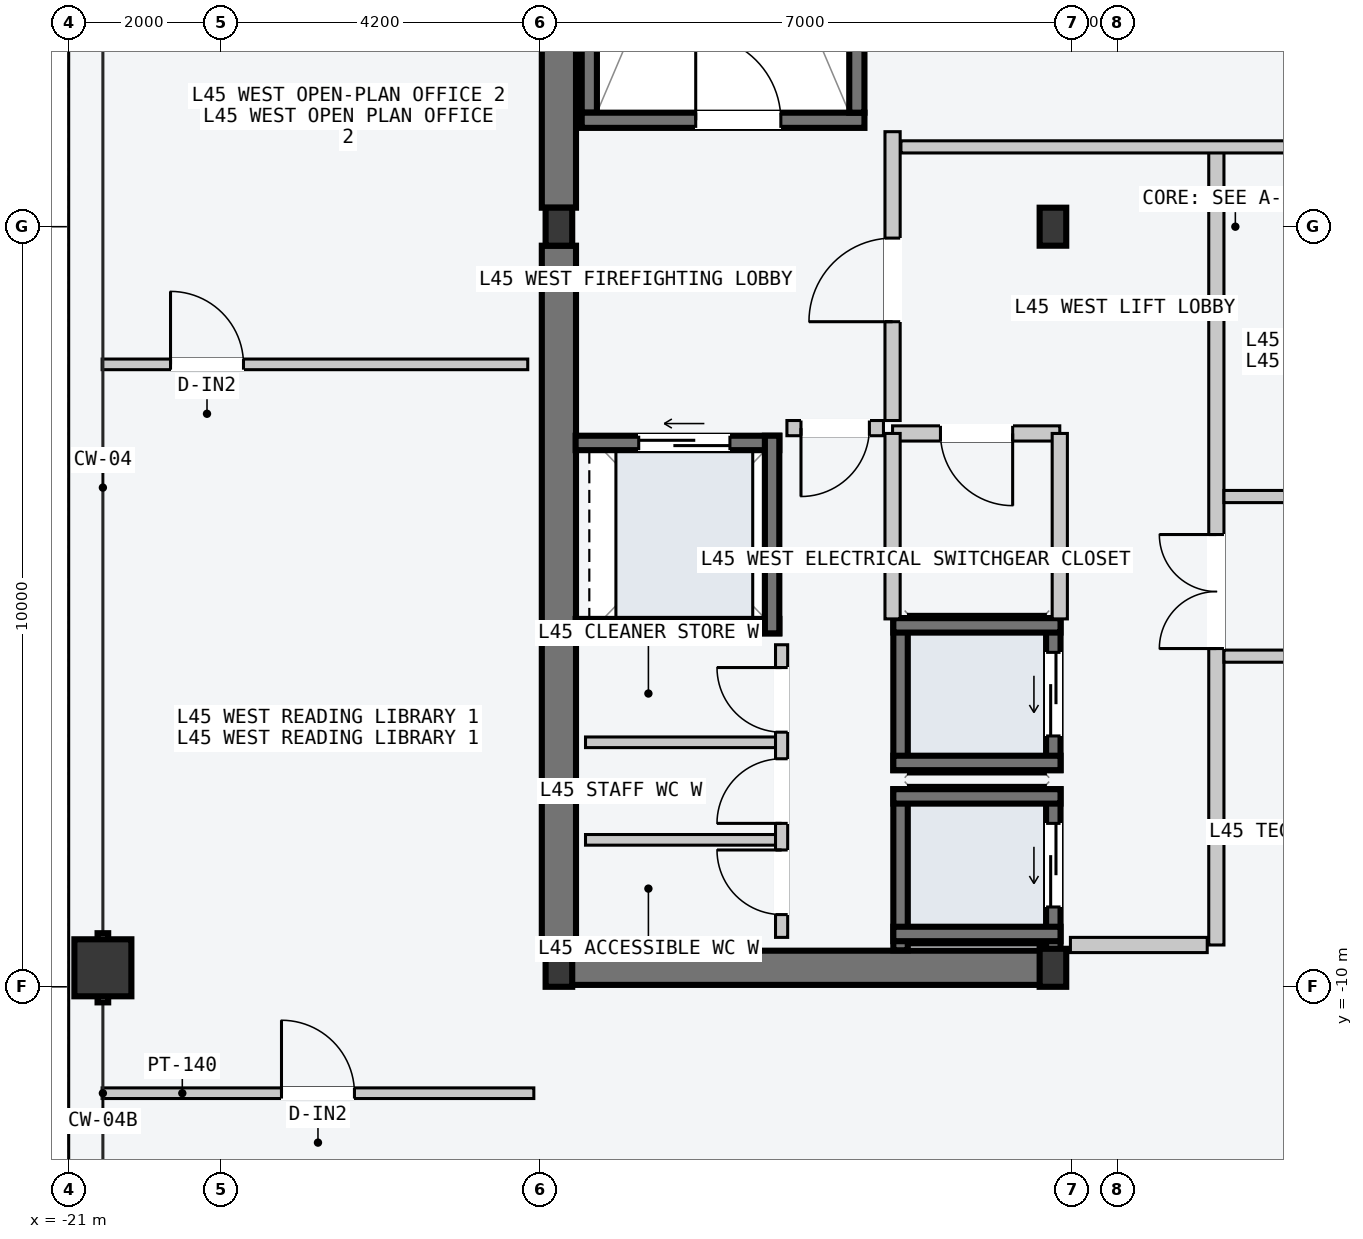
"""IFC4 building model, lengths in metres.
Left out: names, types, materials, properties, quantities, classifications, styles, units other than length and angle.
Written with IfcOpenShell. Run it as: python <this file> out.ifc"""

import sys

from ifc_helpers import new_model, si_unit, direction, frame, frame_2d, origin, origin_2d, place, context, subcontext, project, spatial, rectangle, hollow_rectangle, i_section, extrude, element, fill, save


model = new_model("IFC4")
c1 = context("Model", 3, precision=1e-05, world=origin(), true_north=direction((0.0, 1.0)))
c2 = subcontext(c1, "Body", "Model", "MODEL_VIEW")
j1 = project(units=[si_unit("LENGTHUNIT", "METRE"), si_unit("PLANEANGLEUNIT", "RADIAN")], contexts=[c1])
p1 = place(None, origin())
s1 = spatial("IfcSite", under=j1, at=p1, CompositionType="ELEMENT")
p2 = place(p1, origin())
s2 = spatial("IfcBuilding", under=s1, at=p2, CompositionType="ELEMENT")
p3 = place(p2, frame((0.0, 0.0, 173.1)))
s3 = spatial("IfcBuildingStorey", under=s2, at=p3, CompositionType="ELEMENT", Elevation=173.1)
p4 = place(p3, frame((-14.53, -9.75, -0.2), z_axis=(0.0, 0.0, 1.0), x_axis=(1.0, 0.0, 0.0)))
e1 = element("IfcWall", 1, at=p4, inside=s3, PredefinedType="SHEAR", context=c2, shape_type="SweptSolid", body=[
    extrude(rectangle(XDim=6.46, YDim=0.45, at=frame_2d((3.23, 0.0))), origin(), (0.0, 0.0, 1.0), 3.6),
])
for number, where, z_axis, x_axis in (
    (2, (-14.55, -9.5, -0.2), (0.0, 0.0, 1.0), (0.0, 1.0, 0.0)),
    (3, (-14.55, 0.25, -0.2), (0.0, 0.0, 1.0), (0.0, 1.0, 0.0)),
):
    element("IfcWall", number, at=place(p3, frame(where, z_axis=z_axis, x_axis=x_axis)), inside=s3, PredefinedType="SHEAR", context=c2, shape_type="SweptSolid", body=[
        extrude(rectangle(XDim=9.25, YDim=0.45, at=frame_2d((4.625, 0.0))), origin(), (0.0, 0.0, 1.0), 3.6),
    ])
p5 = place(p3, frame((-14.15, 1.5, -0.2), z_axis=(0.0, 0.0, 1.0), x_axis=(0.0, 1.0, 0.0)))
e4 = element("IfcWall", 4, at=p5, inside=s3, PredefinedType="SOLIDWALL", context=c2, shape_type="SweptSolid", body=[
    extrude(rectangle(XDim=7.8, YDim=0.2, at=frame_2d((3.9, 0.0))), origin(), (0.0, 0.0, 1.0), 3.6),
])
p6 = place(p3, frame((-14.25, 1.4, -0.2), z_axis=(0.0, 0.0, 1.0), x_axis=(1.0, 0.0, 0.0)))
e5 = element("IfcWall", 5, at=p6, inside=s3, PredefinedType="SOLIDWALL", context=c2, shape_type="SweptSolid", body=[
    extrude(rectangle(XDim=3.72, YDim=0.2, at=frame_2d((1.86, 0.0))), origin(), (0.0, 0.0, 1.0), 3.6),
])
p7 = place(p6, frame((1.5, 0.0, 0.2)))
e6 = element("IfcOpeningElement", 6, at=p7, cuts=e5, PredefinedType="OPENING", context=c2, shape_type="SweptSolid", body=[
    extrude(rectangle(XDim=1.12, YDim=2.18, at=frame_2d((0.56, 1.09))), frame((0.0, 0.11, 0.0), z_axis=(0.0, -1.0, 0.0), x_axis=(1.0, 0.0, 0.0)), (0.0, 0.0, 1.0), 0.22),
])
p8 = place(p3, frame((-10.63, 1.5, -0.2), z_axis=(0.0, 0.0, 1.0), x_axis=(0.0, 1.0, 0.0)))
e7 = element("IfcWall", 7, at=p8, inside=s3, PredefinedType="SOLIDWALL", context=c2, shape_type="SweptSolid", body=[
    extrude(rectangle(XDim=7.8, YDim=0.2, at=frame_2d((3.9, 0.0))), origin(), (0.0, 0.0, 1.0), 3.6),
])
for number, where, z_axis, x_axis in (
    (8, (-14.55, -9.75, 0.0), (0.0, 0.0, 1.0), (1.0, 0.0, 0.0)),
    (9, (-14.55, 0.0, 0.0), (0.0, 0.0, 1.0), (1.0, 0.0, 0.0)),
    (10, (-8.05, -9.75, 0.0), (0.0, 0.0, 1.0), (1.0, 0.0, 0.0)),
    (11, (-8.05, 0.0, 0.0), (0.0, 0.0, 1.0), (1.0, 0.0, 0.0)),
):
    element("IfcColumn", number, at=place(p3, frame(where, z_axis=z_axis, x_axis=x_axis)), inside=s3, PredefinedType="COLUMN", context=c2, shape_type="SweptSolid", body=[
        extrude(i_section(OverallWidth=0.35, OverallDepth=0.5, WebThickness=0.02, FlangeThickness=0.032, at=origin_2d()), origin(), (0.0, 0.0, 1.0), 3.6),
    ])
p9 = place(p3, frame((-20.55, -9.75, 0.0), z_axis=(0.0, 0.0, 1.0), x_axis=(0.0, 1.0, 0.0)))
e12 = element("IfcColumn", 12, at=p9, inside=s3, PredefinedType="COLUMN", context=c2, shape_type="SweptSolid", body=[
    extrude(hollow_rectangle(XDim=0.75, YDim=0.75, WallThickness=0.032, at=origin_2d()), origin(), (0.0, 0.0, 1.0), 3.6),
])
p10 = place(p3, frame((-8.045, -9.52, -0.2), z_axis=(0.0, 0.0, 1.0), x_axis=(0.0, 1.0, 0.0)))
e13 = element("IfcWall", 13, at=p10, inside=s3, PredefinedType="SOLIDWALL", context=c2, shape_type="SweptSolid", body=[
    extrude(rectangle(XDim=2.12, YDim=0.19, at=frame_2d((1.06, 0.0))), origin(), (0.0, 0.0, 1.0), 3.6),
])
p11 = place(p10, frame((0.57, 0.0, 0.2)))
e14 = element("IfcOpeningElement", 14, at=p11, cuts=e13, PredefinedType="OPENING", context=c2, shape_type="SweptSolid", body=[
    extrude(rectangle(XDim=1.1, YDim=2.2, at=frame_2d((0.55, 1.1))), frame((0.0, 0.105, 0.0), z_axis=(0.0, -1.0, 0.0), x_axis=(1.0, 0.0, 0.0)), (0.0, 0.0, 1.0), 0.21),
])
p12 = place(p3, frame((-10.055, -9.52, -0.2), z_axis=(0.0, 0.0, 1.0), x_axis=(0.0, 1.0, 0.0)))
e15 = element("IfcWall", 15, at=p12, inside=s3, PredefinedType="SOLIDWALL", context=c2, shape_type="SweptSolid", body=[
    extrude(rectangle(XDim=2.12, YDim=0.19, at=frame_2d((1.06, 0.0))), origin(), (0.0, 0.0, 1.0), 3.6),
])
for number, where, z_axis, x_axis in (
    (16, (-10.15, -7.495, -0.2), (0.0, 0.0, 1.0), (1.0, 0.0, 0.0)),
    (17, (-10.15, -9.305, -0.2), (0.0, 0.0, 1.0), (1.0, 0.0, 0.0)),
):
    element("IfcWall", number, at=place(p3, frame(where, z_axis=z_axis, x_axis=x_axis)), inside=s3, PredefinedType="SOLIDWALL", context=c2, shape_type="SweptSolid", body=[
        extrude(rectangle(XDim=2.2, YDim=0.19, at=frame_2d((1.1, 0.0))), origin(), (0.0, 0.0, 1.0), 3.6),
    ])
p13 = place(p3, frame((-8.045, -7.15, -0.2), z_axis=(0.0, 0.0, 1.0), x_axis=(0.0, 1.0, 0.0)))
e18 = element("IfcWall", 18, at=p13, inside=s3, PredefinedType="SOLIDWALL", context=c2, shape_type="SweptSolid", body=[
    extrude(rectangle(XDim=2.0, YDim=0.19, at=frame_2d((1.0, 0.0))), origin(), (0.0, 0.0, 1.0), 3.6),
])
p14 = place(p13, frame((0.45, 0.0, 0.2)))
e19 = element("IfcOpeningElement", 19, at=p14, cuts=e18, PredefinedType="OPENING", context=c2, shape_type="SweptSolid", body=[
    extrude(rectangle(XDim=1.1, YDim=2.2, at=frame_2d((0.55, 1.1))), frame((0.0, 0.105, 0.0), z_axis=(0.0, -1.0, 0.0), x_axis=(1.0, 0.0, 0.0)), (0.0, 0.0, 1.0), 0.21),
])
p15 = place(p3, frame((-10.055, -7.15, -0.2), z_axis=(0.0, 0.0, 1.0), x_axis=(0.0, 1.0, 0.0)))
e20 = element("IfcWall", 20, at=p15, inside=s3, PredefinedType="SOLIDWALL", context=c2, shape_type="SweptSolid", body=[
    extrude(rectangle(XDim=2.0, YDim=0.19, at=frame_2d((1.0, 0.0))), origin(), (0.0, 0.0, 1.0), 3.6),
])
for number, where, z_axis, x_axis in (
    (21, (-10.15, -5.245, -0.2), (0.0, 0.0, 1.0), (1.0, 0.0, 0.0)),
    (22, (-10.15, -7.055, -0.2), (0.0, 0.0, 1.0), (1.0, 0.0, 0.0)),
):
    element("IfcWall", number, at=place(p3, frame(where, z_axis=z_axis, x_axis=x_axis)), inside=s3, PredefinedType="SOLIDWALL", context=c2, shape_type="SweptSolid", body=[
        extrude(rectangle(XDim=2.2, YDim=0.19, at=frame_2d((1.1, 0.0))), origin(), (0.0, 0.0, 1.0), 3.6),
    ])
p16 = place(p3, frame((-14.33, -2.845, -0.2), z_axis=(0.0, 0.0, 1.0), x_axis=(1.0, 0.0, 0.0)))
e23 = element("IfcWall", 23, at=p16, inside=s3, PredefinedType="SOLIDWALL", context=c2, shape_type="SweptSolid", body=[
    extrude(rectangle(XDim=2.68, YDim=0.19, at=frame_2d((1.34, 0.0))), origin(), (0.0, 0.0, 1.0), 3.6),
])
p17 = place(p16, frame((0.83, 0.0, 0.2)))
e24 = element("IfcOpeningElement", 24, at=p17, cuts=e23, PredefinedType="OPENING", context=c2, shape_type="SweptSolid", body=[
    extrude(rectangle(XDim=1.2, YDim=2.2, at=frame_2d((0.6, 1.1))), frame((0.0, 0.105, 0.0), z_axis=(0.0, -1.0, 0.0), x_axis=(1.0, 0.0, 0.0)), (0.0, 0.0, 1.0), 0.21),
])
p18 = place(p3, frame((-14.33, -5.255, -0.2), z_axis=(0.0, 0.0, 1.0), x_axis=(1.0, 0.0, 0.0)))
e25 = element("IfcWall", 25, at=p18, inside=s3, PredefinedType="SOLIDWALL", context=c2, shape_type="SweptSolid", body=[
    extrude(rectangle(XDim=2.68, YDim=0.19, at=frame_2d((1.34, 0.0))), origin(), (0.0, 0.0, 1.0), 3.6),
])
p19 = place(p3, frame((-11.745, -5.35, -0.2), z_axis=(0.0, 0.0, 1.0), x_axis=(0.0, 1.0, 0.0)))
e26 = element("IfcWall", 26, at=p19, inside=s3, PredefinedType="SOLIDWALL", context=c2, shape_type="SweptSolid", body=[
    extrude(rectangle(XDim=2.6, YDim=0.19, at=frame_2d((1.3, 0.0))), origin(), (0.0, 0.0, 1.0), 3.6),
])
p20 = place(p3, frame((-5.9, -9.45, 0.0), z_axis=(0.0, 0.0, 1.0), x_axis=(0.0, 1.0, 0.0)))
e27 = element("IfcWall", 27, at=p20, inside=s3, PredefinedType="PARTITIONING", context=c2, shape_type="SweptSolid", body=[
    extrude(rectangle(XDim=10.5, YDim=0.2, at=frame_2d((5.25, 0.0))), origin(), (0.0, 0.0, 1.0), 3.4),
])
p21 = place(p20, frame((3.9, 0.0, 0.0)))
e28 = element("IfcOpeningElement", 28, at=p21, cuts=e27, PredefinedType="OPENING", context=c2, shape_type="SweptSolid", body=[
    extrude(rectangle(XDim=1.5, YDim=2.2, at=frame_2d((0.75, 1.1))), frame((0.0, 0.11, 0.0), z_axis=(0.0, -1.0, 0.0), x_axis=(1.0, 0.0, 0.0)), (0.0, 0.0, 1.0), 0.22),
])
p22 = place(p3, frame((-6.02, -9.45, 0.0), z_axis=(0.0, 0.0, 1.0), x_axis=(-1.0, 0.0, 0.0)))
e29 = element("IfcWall", 29, at=p22, inside=s3, PredefinedType="PARTITIONING", context=c2, shape_type="SweptSolid", body=[
    extrude(rectangle(XDim=1.8, YDim=0.2, at=frame_2d((0.9, 0.0))), origin(), (0.0, 0.0, 1.0), 3.4),
])
p23 = place(p3, frame((-10.16, -2.55, 0.0), z_axis=(0.0, 0.0, 1.0), x_axis=(0.0, 1.0, 0.0)))
e30 = element("IfcWall", 30, at=p23, inside=s3, PredefinedType="PARTITIONING", context=c2, shape_type="SweptSolid", body=[
    extrude(rectangle(XDim=3.8, YDim=0.2, at=frame_2d((1.9, 0.0))), origin(), (0.0, 0.0, 1.0), 3.4),
])
p24 = place(p23, frame((1.3, 0.0, 0.0)))
e31 = element("IfcOpeningElement", 31, at=p24, cuts=e30, PredefinedType="OPENING", context=c2, shape_type="SweptSolid", body=[
    extrude(rectangle(XDim=1.1, YDim=2.15, at=frame_2d((0.55, 1.075))), frame((0.0, 0.11, 0.0), z_axis=(0.0, -1.0, 0.0), x_axis=(1.0, 0.0, 0.0)), (0.0, 0.0, 1.0), 0.22),
])
p25 = place(p3, frame((-10.28, -2.65, 0.0), z_axis=(0.0, 0.0, 1.0), x_axis=(-1.0, 0.0, 0.0)))
e32 = element("IfcWall", 32, at=p25, inside=s3, PredefinedType="PARTITIONING", context=c2, shape_type="SweptSolid", body=[
    extrude(rectangle(XDim=1.27, YDim=0.2, at=frame_2d((0.635, 0.0))), origin(), (0.0, 0.0, 1.0), 3.4),
])
p26 = place(p25, frame((0.185, 0.0, 0.0)))
e33 = element("IfcOpeningElement", 33, at=p26, cuts=e32, PredefinedType="OPENING", context=c2, shape_type="SweptSolid", body=[
    extrude(rectangle(XDim=0.9, YDim=2.15, at=frame_2d((0.45, 1.075))), frame((0.0, 0.11, 0.0), z_axis=(0.0, -1.0, 0.0), x_axis=(1.0, 0.0, 0.0)), (0.0, 0.0, 1.0), 0.22),
])
p27 = place(p3, frame((-7.96, -2.72, 0.0), z_axis=(0.0, 0.0, 1.0), x_axis=(-1.0, 0.0, 0.0)))
e34 = element("IfcWall", 34, at=p27, inside=s3, PredefinedType="PARTITIONING", context=c2, shape_type="SweptSolid", body=[
    extrude(rectangle(XDim=2.2, YDim=0.2, at=frame_2d((1.1, 0.0))), origin(), (0.0, 0.0, 1.0), 3.4),
])
p28 = place(p27, frame((0.62, 0.0, 0.0)))
e35 = element("IfcOpeningElement", 35, at=p28, cuts=e34, PredefinedType="OPENING", context=c2, shape_type="SweptSolid", body=[
    extrude(rectangle(XDim=0.95, YDim=2.1, at=frame_2d((0.475, 1.05))), frame((0.0, 0.11, 0.0), z_axis=(0.0, -1.0, 0.0), x_axis=(1.0, 0.0, 0.0)), (0.0, 0.0, 1.0), 0.22),
])
for number, where, z_axis, x_axis in (
    (36, (-7.96, -5.16, 0.0), (0.0, 0.0, 1.0), (0.0, 1.0, 0.0)),
    (37, (-10.16, -5.16, 0.0), (0.0, 0.0, 1.0), (0.0, 1.0, 0.0)),
):
    element("IfcWall", number, at=place(p3, frame(where, z_axis=z_axis, x_axis=x_axis)), inside=s3, PredefinedType="PARTITIONING", context=c2, shape_type="SweptSolid", body=[
        extrude(rectangle(XDim=2.44, YDim=0.2, at=frame_2d((1.22, 0.0))), origin(), (0.0, 0.0, 1.0), 3.4),
    ])
for number, where, z_axis, x_axis in (
    (38, (-11.7, -8.067, 0.0), (0.0, 0.0, 1.0), (-1.0, 0.0, 0.0)),
    (39, (-11.7, -6.783, 0.0), (0.0, 0.0, 1.0), (-1.0, 0.0, 0.0)),
):
    element("IfcWall", number, at=place(p3, frame(where, z_axis=z_axis, x_axis=x_axis)), inside=s3, PredefinedType="PARTITIONING", context=c2, shape_type="SweptSolid", body=[
        extrude(rectangle(XDim=2.5, YDim=0.14, at=frame_2d((1.25, 0.0))), origin(), (0.0, 0.0, 1.0), 3.4),
    ])
p29 = place(p3, frame((-11.62, -9.35, 0.0), z_axis=(0.0, 0.0, 1.0), x_axis=(0.0, 1.0, 0.0)))
e40 = element("IfcWall", 40, at=p29, inside=s3, PredefinedType="PARTITIONING", context=c2, shape_type="SweptSolid", body=[
    extrude(rectangle(XDim=3.85, YDim=0.16, at=frame_2d((1.925, 0.0))), origin(), (0.0, 0.0, 1.0), 3.4),
])
p30 = place(p29, frame((0.3, 0.0, 0.0)))
e41 = element("IfcOpeningElement", 41, at=p30, cuts=e40, PredefinedType="OPENING", context=c2, shape_type="SweptSolid", body=[
    extrude(rectangle(XDim=0.85, YDim=2.12, at=frame_2d((0.425, 1.06))), frame((0.0, 0.09, 0.0), z_axis=(0.0, -1.0, 0.0), x_axis=(1.0, 0.0, 0.0)), (0.0, 0.0, 1.0), 0.18),
])
p31 = place(p29, frame((1.5, 0.0, 0.0)))
e42 = element("IfcOpeningElement", 42, at=p31, cuts=e40, PredefinedType="OPENING", context=c2, shape_type="SweptSolid", body=[
    extrude(rectangle(XDim=0.85, YDim=2.12, at=frame_2d((0.425, 1.06))), frame((0.0, 0.09, 0.0), z_axis=(0.0, -1.0, 0.0), x_axis=(1.0, 0.0, 0.0)), (0.0, 0.0, 1.0), 0.18),
])
p32 = place(p29, frame((2.7, 0.0, 0.0)))
e43 = element("IfcOpeningElement", 43, at=p32, cuts=e40, PredefinedType="OPENING", context=c2, shape_type="SweptSolid", body=[
    extrude(rectangle(XDim=0.85, YDim=2.12, at=frame_2d((0.425, 1.06))), frame((0.0, 0.09, 0.0), z_axis=(0.0, -1.0, 0.0), x_axis=(1.0, 0.0, 0.0)), (0.0, 0.0, 1.0), 0.18),
])
p33 = place(p3, frame((-10.05, 1.05, 0.0), z_axis=(0.0, 0.0, 1.0), x_axis=(1.0, 0.0, 0.0)))
e44 = element("IfcWall", 44, at=p33, inside=s3, PredefinedType="PARTITIONING", context=c2, shape_type="SweptSolid", body=[
    extrude(rectangle(XDim=8.79, YDim=0.16, at=frame_2d((4.395, 0.0))), origin(), (0.0, 0.0, 1.0), 3.4),
])
for number, where, z_axis, x_axis in (
    (45, (-5.8, -3.55, 0.0), (0.0, 0.0, 1.0), (1.0, 0.0, 0.0)),
    (46, (-5.8, -5.65, 0.0), (0.0, 0.0, 1.0), (1.0, 0.0, 0.0)),
):
    element("IfcWall", number, at=place(p3, frame(where, z_axis=z_axis, x_axis=x_axis)), inside=s3, PredefinedType="PARTITIONING", context=c2, shape_type="SweptSolid", body=[
        extrude(rectangle(XDim=4.54, YDim=0.16, at=frame_2d((2.27, 0.0))), origin(), (0.0, 0.0, 1.0), 3.4),
    ])
p34 = place(p3, frame((-20.56, -11.4, 0.0), z_axis=(0.0, 0.0, 1.0), x_axis=(1.0, 0.0, 0.0)))
e47 = element("IfcWall", 47, at=p34, inside=s3, PredefinedType="PARTITIONING", context=c2, shape_type="SweptSolid", body=[
    extrude(rectangle(XDim=5.68, YDim=0.14, at=frame_2d((2.84, 0.0))), origin(), (0.0, 0.0, 1.0), 3.4),
])
p35 = place(p34, frame((2.36, 0.0, 0.0)))
e48 = element("IfcOpeningElement", 48, at=p35, cuts=e47, PredefinedType="OPENING", context=c2, shape_type="SweptSolid", body=[
    extrude(rectangle(XDim=0.96, YDim=2.18, at=frame_2d((0.48, 1.09))), frame((0.0, 0.08, 0.0), z_axis=(0.0, -1.0, 0.0), x_axis=(1.0, 0.0, 0.0)), (0.0, 0.0, 1.0), 0.16),
])
p36 = place(p3, frame((-20.56, -1.811, 0.0), z_axis=(0.0, 0.0, 1.0), x_axis=(1.0, 0.0, 0.0)))
e49 = element("IfcWall", 49, at=p36, inside=s3, PredefinedType="PARTITIONING", context=c2, shape_type="SweptSolid", body=[
    extrude(rectangle(XDim=5.6, YDim=0.14, at=frame_2d((2.8, 0.0))), origin(), (0.0, 0.0, 1.0), 3.4),
])
p37 = place(p36, frame((0.9, 0.0, 0.0)))
e50 = element("IfcOpeningElement", 50, at=p37, cuts=e49, PredefinedType="OPENING", context=c2, shape_type="SweptSolid", body=[
    extrude(rectangle(XDim=0.96, YDim=2.18, at=frame_2d((0.48, 1.09))), frame((0.0, 0.08, 0.0), z_axis=(0.0, -1.0, 0.0), x_axis=(1.0, 0.0, 0.0)), (0.0, 0.0, 1.0), 0.16),
])
p38 = place(p7, origin())
e51 = element("IfcDoor", 51, at=p38, inside=s3, OperationType="SINGLE_SWING_LEFT", PredefinedType="DOOR", context=c2, shape_type="SweptSolid", body=[
    extrude(rectangle(XDim=1.12, YDim=2.18, at=frame_2d((0.56, 1.09))), frame((0.0, 0.025, 0.0), z_axis=(0.0, -1.0, 0.0), x_axis=(1.0, 0.0, 0.0)), (0.0, 0.0, 1.0), 0.05),
])
fill(e6, e51)
p39 = place(p11, origin())
e52 = element("IfcDoor", 52, at=p39, inside=s3, OperationType="SLIDING_TO_LEFT", PredefinedType="DOOR", context=c2, shape_type="SweptSolid", body=[
    extrude(rectangle(XDim=1.1, YDim=2.2, at=frame_2d((0.55, 1.1))), frame((0.0, 0.025, 0.0), z_axis=(0.0, -1.0, 0.0), x_axis=(1.0, 0.0, 0.0)), (0.0, 0.0, 1.0), 0.05),
])
fill(e14, e52)
p40 = place(p14, origin())
e53 = element("IfcDoor", 53, at=p40, inside=s3, OperationType="SLIDING_TO_LEFT", PredefinedType="DOOR", context=c2, shape_type="SweptSolid", body=[
    extrude(rectangle(XDim=1.1, YDim=2.2, at=frame_2d((0.55, 1.1))), frame((0.0, 0.025, 0.0), z_axis=(0.0, -1.0, 0.0), x_axis=(1.0, 0.0, 0.0)), (0.0, 0.0, 1.0), 0.05),
])
fill(e19, e53)
p41 = place(p17, origin())
e54 = element("IfcDoor", 54, at=p41, inside=s3, OperationType="SLIDING_TO_LEFT", PredefinedType="DOOR", context=c2, shape_type="SweptSolid", body=[
    extrude(rectangle(XDim=1.2, YDim=2.2, at=frame_2d((0.6, 1.1))), frame((0.0, 0.025, 0.0), z_axis=(0.0, -1.0, 0.0), x_axis=(1.0, 0.0, 0.0)), (0.0, 0.0, 1.0), 0.05),
])
fill(e24, e54)
p42 = place(p21, origin())
e55 = element("IfcDoor", 55, at=p42, inside=s3, OperationType="DOUBLE_DOOR_SINGLE_SWING", PredefinedType="DOOR", context=c2, shape_type="SweptSolid", body=[
    extrude(rectangle(XDim=1.5, YDim=2.2, at=frame_2d((0.75, 1.1))), frame((0.0, 0.025, 0.0), z_axis=(0.0, -1.0, 0.0), x_axis=(1.0, 0.0, 0.0)), (0.0, 0.0, 1.0), 0.05),
])
fill(e28, e55)
p43 = place(p24, origin())
e56 = element("IfcDoor", 56, at=p43, inside=s3, OperationType="SINGLE_SWING_LEFT", PredefinedType="DOOR", context=c2, shape_type="SweptSolid", body=[
    extrude(rectangle(XDim=1.1, YDim=2.15, at=frame_2d((0.55, 1.075))), frame((0.0, 0.025, 0.0), z_axis=(0.0, -1.0, 0.0), x_axis=(1.0, 0.0, 0.0)), (0.0, 0.0, 1.0), 0.05),
])
fill(e31, e56)
p44 = place(p26, origin())
e57 = element("IfcDoor", 57, at=p44, inside=s3, OperationType="SINGLE_SWING_RIGHT", PredefinedType="DOOR", context=c2, shape_type="SweptSolid", body=[
    extrude(rectangle(XDim=0.9, YDim=2.15, at=frame_2d((0.45, 1.075))), frame((0.0, 0.025, 0.0), z_axis=(0.0, -1.0, 0.0), x_axis=(1.0, 0.0, 0.0)), (0.0, 0.0, 1.0), 0.05),
])
fill(e33, e57)
p45 = place(p28, origin())
e58 = element("IfcDoor", 58, at=p45, inside=s3, OperationType="SINGLE_SWING_LEFT", PredefinedType="DOOR", context=c2, shape_type="SweptSolid", body=[
    extrude(rectangle(XDim=0.95, YDim=2.1, at=frame_2d((0.475, 1.05))), frame((0.0, 0.025, 0.0), z_axis=(0.0, -1.0, 0.0), x_axis=(1.0, 0.0, 0.0)), (0.0, 0.0, 1.0), 0.05),
])
fill(e35, e58)
p46 = place(p30, origin())
e59 = element("IfcDoor", 59, at=p46, inside=s3, OperationType="SINGLE_SWING_RIGHT", PredefinedType="DOOR", context=c2, shape_type="SweptSolid", body=[
    extrude(rectangle(XDim=0.85, YDim=2.12, at=frame_2d((0.425, 1.06))), frame((0.0, 0.025, 0.0), z_axis=(0.0, -1.0, 0.0), x_axis=(1.0, 0.0, 0.0)), (0.0, 0.0, 1.0), 0.05),
])
fill(e41, e59)
p47 = place(p31, origin())
e60 = element("IfcDoor", 60, at=p47, inside=s3, OperationType="SINGLE_SWING_LEFT", PredefinedType="DOOR", context=c2, shape_type="SweptSolid", body=[
    extrude(rectangle(XDim=0.85, YDim=2.12, at=frame_2d((0.425, 1.06))), frame((0.0, 0.025, 0.0), z_axis=(0.0, -1.0, 0.0), x_axis=(1.0, 0.0, 0.0)), (0.0, 0.0, 1.0), 0.05),
])
fill(e42, e60)
p48 = place(p32, origin())
e61 = element("IfcDoor", 61, at=p48, inside=s3, OperationType="SINGLE_SWING_RIGHT", PredefinedType="DOOR", context=c2, shape_type="SweptSolid", body=[
    extrude(rectangle(XDim=0.85, YDim=2.12, at=frame_2d((0.425, 1.06))), frame((0.0, 0.025, 0.0), z_axis=(0.0, -1.0, 0.0), x_axis=(1.0, 0.0, 0.0)), (0.0, 0.0, 1.0), 0.05),
])
fill(e43, e61)
p49 = place(p35, origin())
e62 = element("IfcDoor", 62, at=p49, inside=s3, OperationType="SINGLE_SWING_LEFT", PredefinedType="DOOR", context=c2, shape_type="SweptSolid", body=[
    extrude(rectangle(XDim=0.96, YDim=2.18, at=frame_2d((0.48, 1.09))), frame((0.0, 0.025, 0.0), z_axis=(0.0, -1.0, 0.0), x_axis=(1.0, 0.0, 0.0)), (0.0, 0.0, 1.0), 0.05),
])
fill(e48, e62)
p50 = place(p37, origin())
e63 = element("IfcDoor", 63, at=p50, inside=s3, OperationType="SINGLE_SWING_LEFT", PredefinedType="DOOR", context=c2, shape_type="SweptSolid", body=[
    extrude(rectangle(XDim=0.96, YDim=2.18, at=frame_2d((0.48, 1.09))), frame((0.0, 0.025, 0.0), z_axis=(0.0, -1.0, 0.0), x_axis=(1.0, 0.0, 0.0)), (0.0, 0.0, 1.0), 0.05),
])
fill(e50, e63)
save(model, sys.argv[1])
